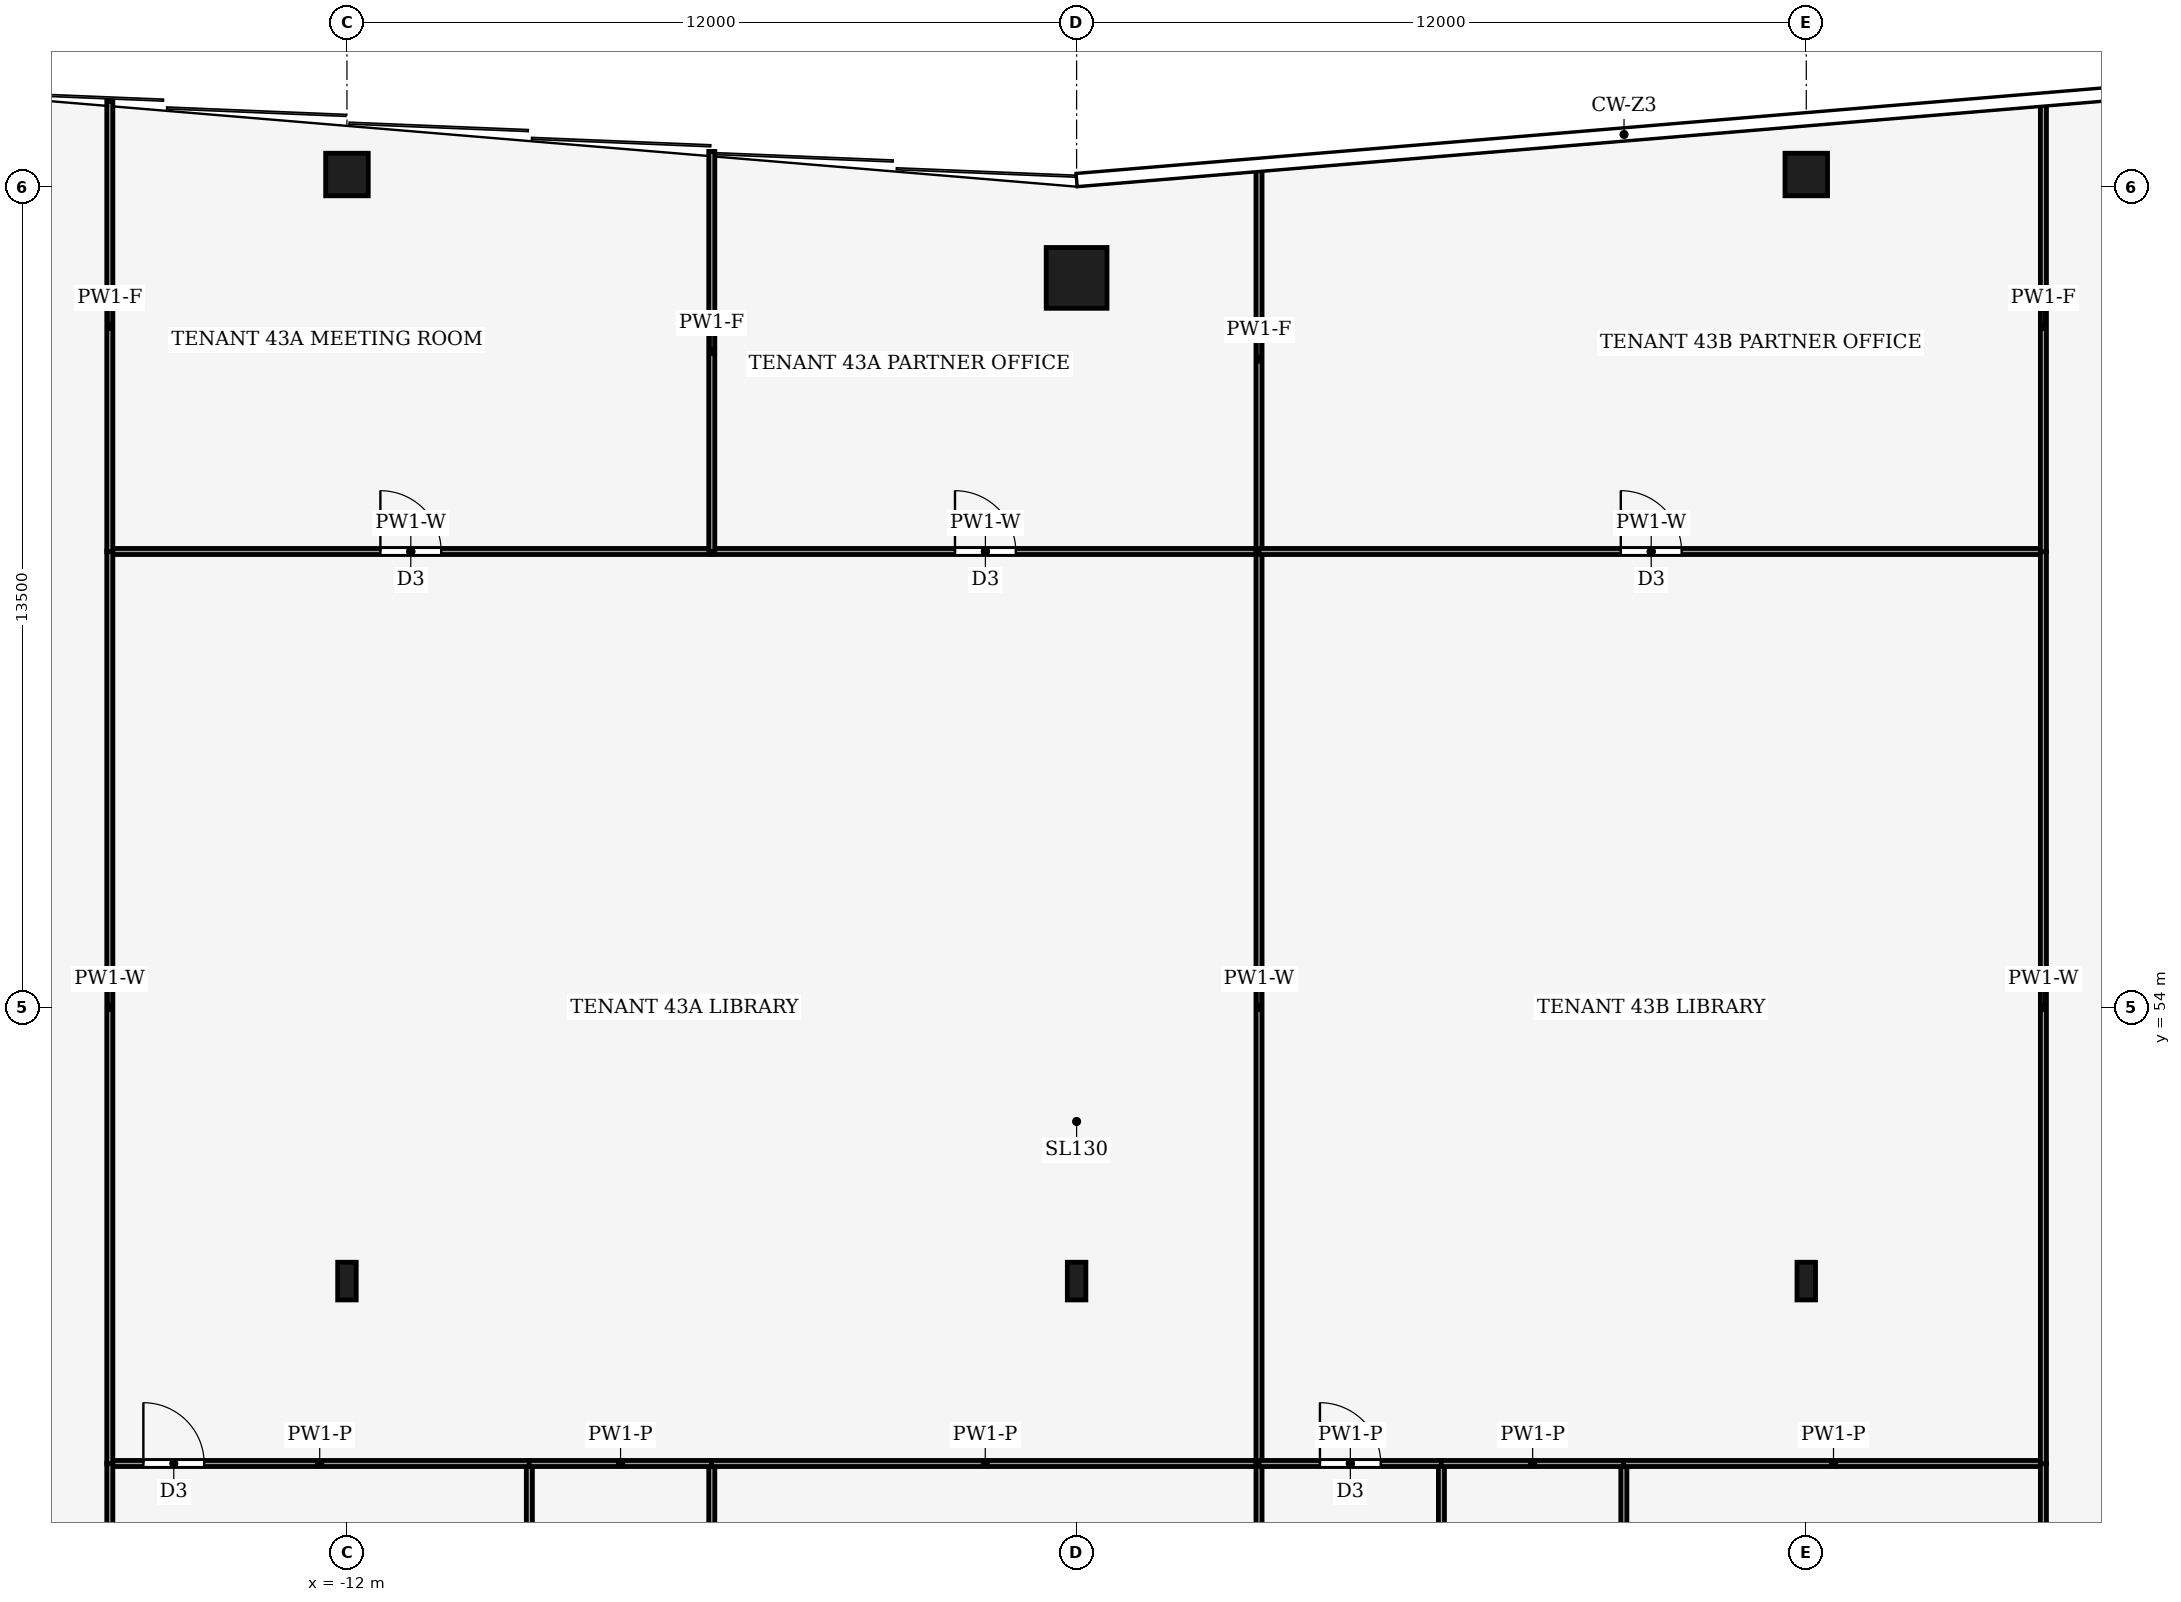
"""IFC4 building model, lengths in metres.
Left out: names, types, materials, properties, quantities, classifications, styles, units other than length and angle.
Written with IfcOpenShell. Run it as: python <this file> out.ifc"""

import sys

from ifc_helpers import new_model, si_unit, direction, frame, frame_2d, origin, origin_2d, place, context, subcontext, project, spatial, rectangle, hollow_rectangle, i_section, extrude, element, fill, save


model = new_model("IFC4")
c1 = context("Model", 3, precision=1e-05, world=origin(), true_north=direction((0.0, 1.0)))
c2 = subcontext(c1, "Body", "Model", "MODEL_VIEW")
j1 = project(units=[si_unit("LENGTHUNIT", "METRE"), si_unit("PLANEANGLEUNIT", "RADIAN")], contexts=[c1])
p1 = place(None, origin())
s1 = spatial("IfcSite", under=j1, at=p1, CompositionType="ELEMENT")
p2 = place(p1, origin())
s2 = spatial("IfcBuilding", under=s1, at=p2, CompositionType="ELEMENT")
p3 = place(p2, frame((0.0, 0.0, 190.0)))
s3 = spatial("IfcBuildingStorey", under=s2, at=p3, CompositionType="ELEMENT", Elevation=190.0)
p4 = place(p3, frame((0.0, 66.0, 0.0), z_axis=(0.0, 0.0, 1.0), x_axis=(1.0, 0.0, 0.0)))
e1 = element("IfcColumn", 1, at=p4, inside=s3, PredefinedType="COLUMN", context=c2, shape_type="SweptSolid", body=[
    extrude(hollow_rectangle(XDim=1.0, YDim=1.0, WallThickness=0.06, at=origin_2d()), origin(), (0.0, 0.0, 1.0), 4.0),
])
for number, where, z_axis, x_axis in (
    (2, (-12.0, 67.7, 0.0), (0.0, 0.0, 1.0), (1.0, 0.0, 0.0)),
    (3, (12.0, 67.7, 0.0), (0.0, 0.0, 1.0), (1.0, 0.0, 0.0)),
):
    element("IfcColumn", number, at=place(p3, frame(where, z_axis=z_axis, x_axis=x_axis)), inside=s3, PredefinedType="COLUMN", context=c2, shape_type="SweptSolid", body=[
        extrude(hollow_rectangle(XDim=0.7, YDim=0.7, WallThickness=0.03, at=origin_2d()), origin(), (0.0, 0.0, 1.0), 4.0),
    ])
for number, where, z_axis, x_axis in (
    (4, (-12.0, 49.5, 0.0), (0.0, 0.0, 1.0), (1.0, 0.0, 0.0)),
    (5, (0.0, 49.5, 0.0), (0.0, 0.0, 1.0), (1.0, 0.0, 0.0)),
    (6, (12.0, 49.5, 0.0), (0.0, 0.0, 1.0), (1.0, 0.0, 0.0)),
):
    element("IfcColumn", number, at=place(p3, frame(where, z_axis=z_axis, x_axis=x_axis)), inside=s3, PredefinedType="COLUMN", context=c2, shape_type="SweptSolid", body=[
        extrude(i_section(OverallWidth=0.305, OverallDepth=0.62, WebThickness=0.021, FlangeThickness=0.04, FilletRadius=0.027, at=origin_2d()), origin(), (0.0, 0.0, 1.0), 4.0),
    ])
p5 = place(p3, frame((-9.0, 46.5, 0.0), z_axis=(0.0, 0.0, 1.0), x_axis=(0.0, -1.0, 0.0)))
e7 = element("IfcWall", 7, at=p5, inside=s3, PredefinedType="PARTITIONING", context=c2, shape_type="SweptSolid", body=[
    extrude(rectangle(XDim=5.6, YDim=0.1, at=frame_2d((2.8, 0.0))), origin(), (0.0, 0.0, 1.0), 3.87),
])
p6 = place(p5, frame((2.3, 0.0, 0.0)))
e8 = element("IfcOpeningElement", 8, at=p6, cuts=e7, PredefinedType="OPENING", context=c2, shape_type="SweptSolid", body=[
    extrude(rectangle(XDim=1.0, YDim=2.1, at=frame_2d((0.5, 1.05))), frame((0.0, 0.06, 0.0), z_axis=(0.0, -1.0, 0.0), x_axis=(1.0, 0.0, 0.0)), (0.0, 0.0, 1.0), 0.12),
])
p7 = place(p3, frame((-15.9, 46.5, 0.0), z_axis=(0.0, 0.0, 1.0), x_axis=(1.0, 0.0, 0.0)))
e9 = element("IfcWall", 9, at=p7, inside=s3, PredefinedType="PARTITIONING", context=c2, shape_type="SweptSolid", body=[
    extrude(rectangle(XDim=6.904, YDim=0.1, at=frame_2d((3.452, 0.0))), origin(), (0.0, 0.0, 1.0), 3.44),
])
p8 = place(p7, frame((0.552, 0.0, 0.0)))
e10 = element("IfcOpeningElement", 10, at=p8, cuts=e9, PredefinedType="OPENING", context=c2, shape_type="SweptSolid", body=[
    extrude(rectangle(XDim=1.0, YDim=2.1, at=frame_2d((0.5, 1.05))), frame((0.0, 0.06, 0.0), z_axis=(0.0, -1.0, 0.0), x_axis=(1.0, 0.0, 0.0)), (0.0, 0.0, 1.0), 0.12),
])
p9 = place(p3, frame((-15.9, 46.504, 0.0), z_axis=(0.0, 0.0, 1.0), x_axis=(0.0, -1.0, 0.0)))
e11 = element("IfcWall", 11, at=p9, inside=s3, PredefinedType="PARTITIONING", context=c2, shape_type="SweptSolid", body=[
    extrude(rectangle(XDim=5.608, YDim=0.1, at=frame_2d((2.804, 0.0))), origin(), (0.0, 0.0, 1.0), 3.44),
])
p10 = place(p3, frame((-6.0, 40.9, 0.0), z_axis=(0.0, 0.0, 1.0), x_axis=(0.0, 1.0, 0.0)))
e12 = element("IfcWall", 12, at=p10, inside=s3, PredefinedType="PARTITIONING", context=c2, shape_type="SweptSolid", body=[
    extrude(rectangle(XDim=5.6, YDim=0.1, at=frame_2d((2.8, 0.0))), origin(), (0.0, 0.0, 1.0), 3.87),
])
p11 = place(p3, frame((-5.996, 46.5, 0.0), z_axis=(0.0, 0.0, 1.0), x_axis=(-1.0, 0.0, 0.0)))
e13 = element("IfcWall", 13, at=p11, inside=s3, PredefinedType="PARTITIONING", context=c2, shape_type="SweptSolid", body=[
    extrude(rectangle(XDim=3.008, YDim=0.1, at=frame_2d((1.504, 0.0))), origin(), (0.0, 0.0, 1.0), 3.44),
])
p12 = place(p3, frame((3.0, 46.5, 0.0), z_axis=(0.0, 0.0, 1.0), x_axis=(-1.0, 0.0, 0.0)))
e14 = element("IfcWall", 14, at=p12, inside=s3, PredefinedType="PARTITIONING", context=c2, shape_type="SweptSolid", body=[
    extrude(rectangle(XDim=9.004, YDim=0.1, at=frame_2d((4.502, 0.0))), origin(), (0.0, 0.0, 1.0), 3.44),
])
p13 = place(p3, frame((3.0, 40.9, 0.0), z_axis=(0.0, 0.0, 1.0), x_axis=(0.0, 1.0, 0.0)))
e15 = element("IfcWall", 15, at=p13, inside=s3, PredefinedType="PARTITIONING", context=c2, shape_type="SweptSolid", body=[
    extrude(rectangle(XDim=5.6, YDim=0.1, at=frame_2d((2.8, 0.0))), origin(), (0.0, 0.0, 1.0), 3.87),
])
p14 = place(p3, frame((-15.9, 61.5, 0.0), z_axis=(0.0, 0.0, 1.0), x_axis=(1.0, 0.0, 0.0)))
e16 = element("IfcWall", 16, at=p14, inside=s3, PredefinedType="PARTITIONING", context=c2, shape_type="SweptSolid", body=[
    extrude(rectangle(XDim=9.9, YDim=0.1, at=frame_2d((4.95, 0.0))), origin(), (0.0, 0.0, 1.0), 3.24),
])
p15 = place(p14, frame((4.45, 0.0, 0.0)))
e17 = element("IfcOpeningElement", 17, at=p15, cuts=e16, PredefinedType="OPENING", context=c2, shape_type="SweptSolid", body=[
    extrude(rectangle(XDim=1.0, YDim=2.1, at=frame_2d((0.5, 1.05))), frame((0.0, 0.06, 0.0), z_axis=(0.0, -1.0, 0.0), x_axis=(1.0, 0.0, 0.0)), (0.0, 0.0, 1.0), 0.12),
])
p16 = place(p3, frame((-6.0, 61.5, 0.0), z_axis=(0.0, 0.0, 1.0), x_axis=(1.0, 0.0, 0.0)))
e18 = element("IfcWall", 18, at=p16, inside=s3, PredefinedType="PARTITIONING", context=c2, shape_type="SweptSolid", body=[
    extrude(rectangle(XDim=9.0, YDim=0.1, at=frame_2d((4.5, 0.0))), origin(), (0.0, 0.0, 1.0), 3.24),
])
p17 = place(p16, frame((4.0, 0.0, 0.0)))
e19 = element("IfcOpeningElement", 19, at=p17, cuts=e18, PredefinedType="OPENING", context=c2, shape_type="SweptSolid", body=[
    extrude(rectangle(XDim=1.0, YDim=2.1, at=frame_2d((0.5, 1.05))), frame((0.0, 0.06, 0.0), z_axis=(0.0, -1.0, 0.0), x_axis=(1.0, 0.0, 0.0)), (0.0, 0.0, 1.0), 0.12),
])
p18 = place(p3, frame((3.0, 46.5, 0.0), z_axis=(0.0, 0.0, 1.0), x_axis=(0.0, 1.0, 0.0)))
e20 = element("IfcWall", 20, at=p18, inside=s3, PredefinedType="PARTITIONING", context=c2, shape_type="SweptSolid", body=[
    extrude(rectangle(XDim=15.0, YDim=0.1, at=frame_2d((7.5, 0.0))), origin(), (0.0, 0.0, 1.0), 3.24),
])
p19 = place(p3, frame((-15.9, 61.504, 0.0), z_axis=(0.0, 0.0, 1.0), x_axis=(0.0, -1.0, 0.0)))
e21 = element("IfcWall", 21, at=p19, inside=s3, PredefinedType="PARTITIONING", context=c2, shape_type="SweptSolid", body=[
    extrude(rectangle(XDim=15.008, YDim=0.1, at=frame_2d((7.504, 0.0))), origin(), (0.0, 0.0, 1.0), 3.24),
])
p20 = place(p3, frame((-6.0, 61.5, 0.0), z_axis=(0.0, 0.0, 1.0), x_axis=(0.0, 1.0, 0.0)))
e22 = element("IfcWall", 22, at=p20, inside=s3, PredefinedType="PARTITIONING", context=c2, shape_type="SweptSolid", body=[
    extrude(rectangle(XDim=6.58, YDim=0.1, at=frame_2d((3.29, 0.0))), origin(), (0.0, 0.0, 1.0), 3.04),
])
p21 = place(p3, frame((-15.9, 68.905, 0.0), z_axis=(0.0, 0.0, 1.0), x_axis=(0.0, -1.0, 0.0)))
e23 = element("IfcWall", 23, at=p21, inside=s3, PredefinedType="PARTITIONING", context=c2, shape_type="SweptSolid", body=[
    extrude(rectangle(XDim=7.409, YDim=0.1, at=frame_2d((3.705, 0.0))), origin(), (0.0, 0.0, 1.0), 3.04),
])
p22 = place(p3, frame((3.0, 61.5, 0.0), z_axis=(0.0, 0.0, 1.0), x_axis=(0.0, 1.0, 0.0)))
e24 = element("IfcWall", 24, at=p22, inside=s3, PredefinedType="PARTITIONING", context=c2, shape_type="SweptSolid", body=[
    extrude(rectangle(XDim=6.33, YDim=0.1, at=frame_2d((3.165, 0.0))), origin(), (0.0, 0.0, 1.0), 3.04),
])
p23 = place(p3, frame((6.0, 46.5, 0.0), z_axis=(0.0, 0.0, 1.0), x_axis=(0.0, -1.0, 0.0)))
e25 = element("IfcWall", 25, at=p23, inside=s3, PredefinedType="PARTITIONING", context=c2, shape_type="SweptSolid", body=[
    extrude(rectangle(XDim=5.6, YDim=0.1, at=frame_2d((2.8, 0.0))), origin(), (0.0, 0.0, 1.0), 3.87),
])
p24 = place(p23, frame((2.3, 0.0, 0.0)))
e26 = element("IfcOpeningElement", 26, at=p24, cuts=e25, PredefinedType="OPENING", context=c2, shape_type="SweptSolid", body=[
    extrude(rectangle(XDim=1.0, YDim=2.1, at=frame_2d((0.5, 1.05))), frame((0.0, 0.06, 0.0), z_axis=(0.0, -1.0, 0.0), x_axis=(1.0, 0.0, 0.0)), (0.0, 0.0, 1.0), 0.12),
])
p25 = place(p3, frame((3.0, 46.5, 0.0), z_axis=(0.0, 0.0, 1.0), x_axis=(1.0, 0.0, 0.0)))
e27 = element("IfcWall", 27, at=p25, inside=s3, PredefinedType="PARTITIONING", context=c2, shape_type="SweptSolid", body=[
    extrude(rectangle(XDim=3.004, YDim=0.1, at=frame_2d((1.502, 0.0))), origin(), (0.0, 0.0, 1.0), 3.44),
])
p26 = place(p25, frame((1.002, 0.0, 0.0)))
e28 = element("IfcOpeningElement", 28, at=p26, cuts=e27, PredefinedType="OPENING", context=c2, shape_type="SweptSolid", body=[
    extrude(rectangle(XDim=1.0, YDim=2.1, at=frame_2d((0.5, 1.05))), frame((0.0, 0.06, 0.0), z_axis=(0.0, -1.0, 0.0), x_axis=(1.0, 0.0, 0.0)), (0.0, 0.0, 1.0), 0.12),
])
p27 = place(p3, frame((9.0, 40.9, 0.0), z_axis=(0.0, 0.0, 1.0), x_axis=(0.0, 1.0, 0.0)))
e29 = element("IfcWall", 29, at=p27, inside=s3, PredefinedType="PARTITIONING", context=c2, shape_type="SweptSolid", body=[
    extrude(rectangle(XDim=5.6, YDim=0.1, at=frame_2d((2.8, 0.0))), origin(), (0.0, 0.0, 1.0), 3.87),
])
p28 = place(p3, frame((9.004, 46.5, 0.0), z_axis=(0.0, 0.0, 1.0), x_axis=(-1.0, 0.0, 0.0)))
e30 = element("IfcWall", 30, at=p28, inside=s3, PredefinedType="PARTITIONING", context=c2, shape_type="SweptSolid", body=[
    extrude(rectangle(XDim=3.008, YDim=0.1, at=frame_2d((1.504, 0.0))), origin(), (0.0, 0.0, 1.0), 3.44),
])
p29 = place(p3, frame((15.9, 46.5, 0.0), z_axis=(0.0, 0.0, 1.0), x_axis=(-1.0, 0.0, 0.0)))
e31 = element("IfcWall", 31, at=p29, inside=s3, PredefinedType="PARTITIONING", context=c2, shape_type="SweptSolid", body=[
    extrude(rectangle(XDim=6.904, YDim=0.1, at=frame_2d((3.452, 0.0))), origin(), (0.0, 0.0, 1.0), 3.44),
])
p30 = place(p3, frame((15.9, 40.896, 0.0), z_axis=(0.0, 0.0, 1.0), x_axis=(0.0, 1.0, 0.0)))
e32 = element("IfcWall", 32, at=p30, inside=s3, PredefinedType="PARTITIONING", context=c2, shape_type="SweptSolid", body=[
    extrude(rectangle(XDim=5.608, YDim=0.1, at=frame_2d((2.804, 0.0))), origin(), (0.0, 0.0, 1.0), 3.44),
])
p31 = place(p3, frame((3.0, 61.5, 0.0), z_axis=(0.0, 0.0, 1.0), x_axis=(1.0, 0.0, 0.0)))
e33 = element("IfcWall", 33, at=p31, inside=s3, PredefinedType="PARTITIONING", context=c2, shape_type="SweptSolid", body=[
    extrude(rectangle(XDim=12.9, YDim=0.1, at=frame_2d((6.45, 0.0))), origin(), (0.0, 0.0, 1.0), 3.24),
])
p32 = place(p31, frame((5.95, 0.0, 0.0)))
e34 = element("IfcOpeningElement", 34, at=p32, cuts=e33, PredefinedType="OPENING", context=c2, shape_type="SweptSolid", body=[
    extrude(rectangle(XDim=1.0, YDim=2.1, at=frame_2d((0.5, 1.05))), frame((0.0, 0.06, 0.0), z_axis=(0.0, -1.0, 0.0), x_axis=(1.0, 0.0, 0.0)), (0.0, 0.0, 1.0), 0.12),
])
p33 = place(p3, frame((15.9, 46.496, 0.0), z_axis=(0.0, 0.0, 1.0), x_axis=(0.0, 1.0, 0.0)))
e35 = element("IfcWall", 35, at=p33, inside=s3, PredefinedType="PARTITIONING", context=c2, shape_type="SweptSolid", body=[
    extrude(rectangle(XDim=15.008, YDim=0.1, at=frame_2d((7.504, 0.0))), origin(), (0.0, 0.0, 1.0), 3.24),
])
p34 = place(p3, frame((15.9, 61.496, 0.0), z_axis=(0.0, 0.0, 1.0), x_axis=(0.0, 1.0, 0.0)))
e36 = element("IfcWall", 36, at=p34, inside=s3, PredefinedType="PARTITIONING", context=c2, shape_type="SweptSolid", body=[
    extrude(rectangle(XDim=7.409, YDim=0.1, at=frame_2d((3.705, 0.0))), origin(), (0.0, 0.0, 1.0), 3.04),
])
p35 = place(p8, origin())
e37 = element("IfcDoor", 37, at=p35, inside=s3, OperationType="SINGLE_SWING_LEFT", PredefinedType="DOOR", context=c2, shape_type="SweptSolid", body=[
    extrude(rectangle(XDim=1.0, YDim=2.1, at=frame_2d((0.5, 1.05))), frame((0.0, 0.025, 0.0), z_axis=(0.0, -1.0, 0.0), x_axis=(1.0, 0.0, 0.0)), (0.0, 0.0, 1.0), 0.05),
])
fill(e10, e37)
p36 = place(p15, origin())
e38 = element("IfcDoor", 38, at=p36, inside=s3, OperationType="SINGLE_SWING_RIGHT", PredefinedType="DOOR", context=c2, shape_type="SweptSolid", body=[
    extrude(rectangle(XDim=1.0, YDim=2.1, at=frame_2d((0.5, 1.05))), frame((0.0, 0.025, 0.0), z_axis=(0.0, -1.0, 0.0), x_axis=(1.0, 0.0, 0.0)), (0.0, 0.0, 1.0), 0.05),
])
fill(e17, e38)
p37 = place(p17, origin())
e39 = element("IfcDoor", 39, at=p37, inside=s3, OperationType="SINGLE_SWING_LEFT", PredefinedType="DOOR", context=c2, shape_type="SweptSolid", body=[
    extrude(rectangle(XDim=1.0, YDim=2.1, at=frame_2d((0.5, 1.05))), frame((0.0, 0.025, 0.0), z_axis=(0.0, -1.0, 0.0), x_axis=(1.0, 0.0, 0.0)), (0.0, 0.0, 1.0), 0.05),
])
fill(e19, e39)
p38 = place(p26, origin())
e40 = element("IfcDoor", 40, at=p38, inside=s3, OperationType="SINGLE_SWING_LEFT", PredefinedType="DOOR", context=c2, shape_type="SweptSolid", body=[
    extrude(rectangle(XDim=1.0, YDim=2.1, at=frame_2d((0.5, 1.05))), frame((0.0, 0.025, 0.0), z_axis=(0.0, -1.0, 0.0), x_axis=(1.0, 0.0, 0.0)), (0.0, 0.0, 1.0), 0.05),
])
fill(e28, e40)
p39 = place(p32, origin())
e41 = element("IfcDoor", 41, at=p39, inside=s3, OperationType="SINGLE_SWING_RIGHT", PredefinedType="DOOR", context=c2, shape_type="SweptSolid", body=[
    extrude(rectangle(XDim=1.0, YDim=2.1, at=frame_2d((0.5, 1.05))), frame((0.0, 0.025, 0.0), z_axis=(0.0, -1.0, 0.0), x_axis=(1.0, 0.0, 0.0)), (0.0, 0.0, 1.0), 0.05),
])
fill(e34, e41)
save(model, sys.argv[1])
